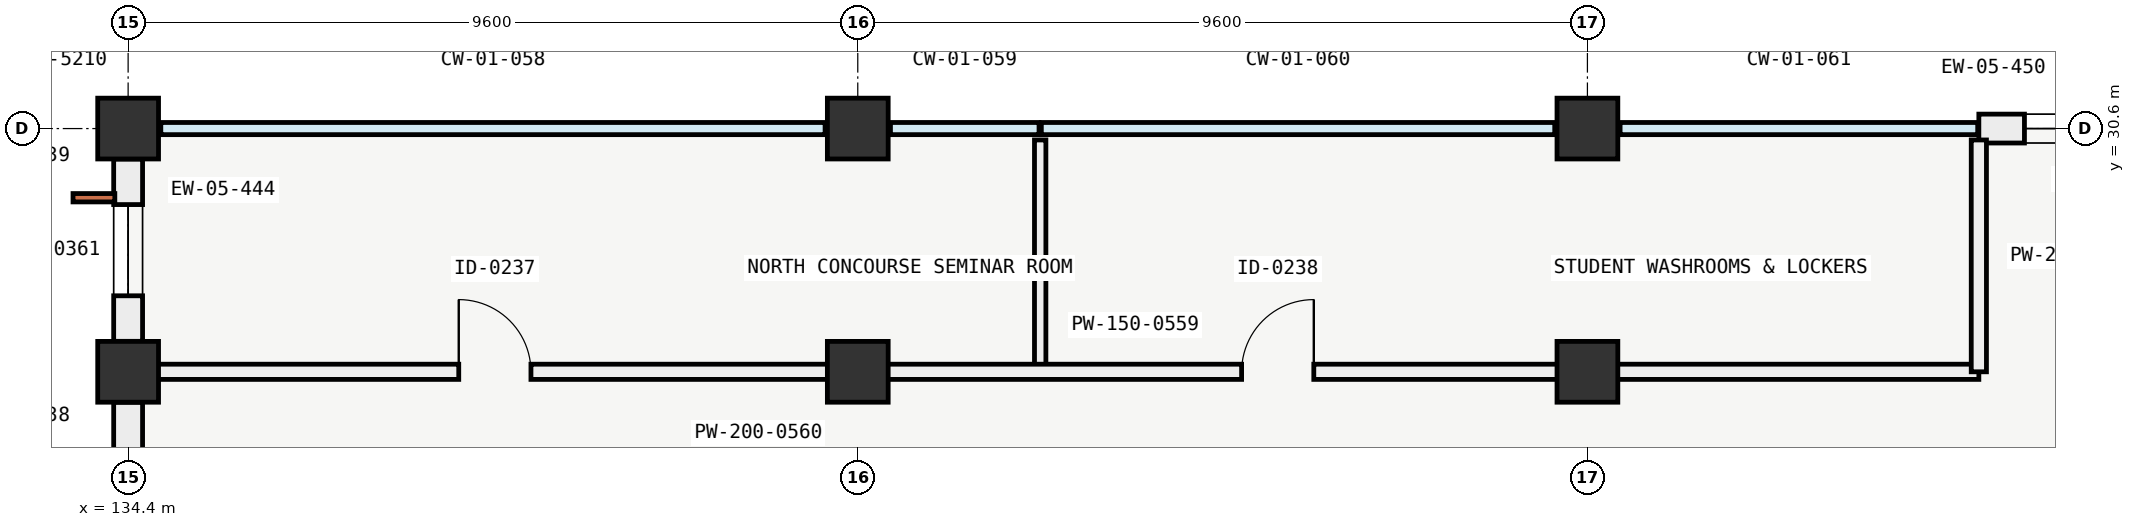
"""IFC4 building model, lengths in metres.
Left out: names, types, materials, properties, quantities, classifications, styles, units other than length and angle.
Written with IfcOpenShell. Run it as: python <this file> out.ifc"""

import sys

from ifc_helpers import new_model, si_unit, direction, frame, frame_2d, origin, origin_2d, place, context, subcontext, project, spatial, rectangle, extrude, element, fill, save


model = new_model("IFC4")
c1 = context("Model", 3, precision=1e-05, world=origin(), true_north=direction((0.0, 1.0)))
c2 = subcontext(c1, "Body", "Model", "MODEL_VIEW")
j1 = project(units=[si_unit("LENGTHUNIT", "METRE"), si_unit("PLANEANGLEUNIT", "RADIAN")], contexts=[c1])
p1 = place(None, origin())
s1 = spatial("IfcSite", under=j1, at=p1, CompositionType="ELEMENT")
p2 = place(p1, origin())
s2 = spatial("IfcBuilding", under=s1, at=p2, CompositionType="ELEMENT")
p3 = place(p2, frame((0.0, 0.0, 5.4)))
s3 = spatial("IfcBuildingStorey", under=s2, at=p3, CompositionType="ELEMENT", Elevation=5.4)
for number, where, z_axis, x_axis in (
    (1, (134.4, 27.4, 0.0), (0.0, 0.0, 1.0), (1.0, 0.0, 0.0)),
    (2, (134.4, 30.6, 0.0), (0.0, 0.0, 1.0), (1.0, 0.0, 0.0)),
    (3, (144.0, 27.4, 0.0), (0.0, 0.0, 1.0), (1.0, 0.0, 0.0)),
    (4, (144.0, 30.6, 0.0), (0.0, 0.0, 1.0), (1.0, 0.0, 0.0)),
    (5, (153.6, 27.4, 0.0), (0.0, 0.0, 1.0), (1.0, 0.0, 0.0)),
    (6, (153.6, 30.6, 0.0), (0.0, 0.0, 1.0), (1.0, 0.0, 0.0)),
):
    element("IfcColumn", number, at=place(p3, frame(where, z_axis=z_axis, x_axis=x_axis)), inside=s3, PredefinedType="COLUMN", context=c2, shape_type="SweptSolid", body=[
        extrude(rectangle(XDim=0.8, YDim=0.8, at=origin_2d()), origin(), (0.0, 0.0, 1.0), 4.2),
    ])
p4 = place(p3, frame((134.4, 24.601, 0.0), z_axis=(0.0, 0.0, 1.0), x_axis=(0.0, 1.0, 0.0)))
e7 = element("IfcWall", 7, at=p4, inside=s3, PredefinedType="SOLIDWALL", context=c2, shape_type="SweptSolid", body=[
    extrude(rectangle(XDim=2.398, YDim=0.38, at=frame_2d((1.199, 0.0))), origin(), (0.0, 0.0, 1.0), 3.25),
])
p5 = place(p4, frame((0.824, 0.0, 0.75)))
e8 = element("IfcOpeningElement", 8, at=p5, cuts=e7, PredefinedType="OPENING", context=c2, shape_type="SweptSolid", body=[
    extrude(rectangle(XDim=0.75, YDim=1.1, at=frame_2d((0.375, 0.55))), frame((0.0, 0.2, 0.0), z_axis=(0.0, -1.0, 0.0), x_axis=(1.0, 0.0, 0.0)), (0.0, 0.0, 1.0), 0.4),
])
p6 = place(p3, frame((134.4, 27.801, 0.0), z_axis=(0.0, 0.0, 1.0), x_axis=(0.0, 1.0, 0.0)))
e9 = element("IfcWall", 9, at=p6, inside=s3, PredefinedType="SOLIDWALL", context=c2, shape_type="SweptSolid", body=[
    extrude(rectangle(XDim=2.398, YDim=0.38, at=frame_2d((1.199, 0.0))), origin(), (0.0, 0.0, 1.0), 3.25),
])
p7 = place(p6, frame((0.599, 0.0, 0.9)))
e10 = element("IfcOpeningElement", 10, at=p7, cuts=e9, PredefinedType="OPENING", context=c2, shape_type="SweptSolid", body=[
    extrude(rectangle(XDim=1.2, YDim=1.8, at=frame_2d((0.6, 0.9))), frame((0.0, 0.2, 0.0), z_axis=(0.0, -1.0, 0.0), x_axis=(1.0, 0.0, 0.0)), (0.0, 0.0, 1.0), 0.4),
])
p8 = place(p3, frame((158.75, 30.6, 0.0), z_axis=(0.0, 0.0, 1.0), x_axis=(1.0, 0.0, 0.0)))
e11 = element("IfcWall", 11, at=p8, inside=s3, PredefinedType="SOLIDWALL", context=c2, shape_type="SweptSolid", body=[
    extrude(rectangle(XDim=3.2, YDim=0.38, at=frame_2d((1.6, 0.0))), origin(), (0.0, 0.0, 1.0), 3.25),
])
p9 = place(p8, frame((0.6, 0.0, 0.75)))
e12 = element("IfcOpeningElement", 12, at=p9, cuts=e11, PredefinedType="OPENING", context=c2, shape_type="SweptSolid", body=[
    extrude(rectangle(XDim=2.0, YDim=1.35, at=frame_2d((1.0, 0.675))), frame((0.0, 0.2, 0.0), z_axis=(0.0, -1.0, 0.0), x_axis=(1.0, 0.0, 0.0)), (0.0, 0.0, 1.0), 0.4),
])
p10 = place(p3, frame((146.4, 27.4, 0.0), z_axis=(0.0, 0.0, 1.0), x_axis=(0.0, 1.0, 0.0)))
e13 = element("IfcWall", 13, at=p10, inside=s3, PredefinedType="PARTITIONING", context=c2, shape_type="SweptSolid", body=[
    extrude(rectangle(XDim=3.05, YDim=0.15, at=frame_2d((1.525, 0.0))), origin(), (0.0, 0.0, 1.0), 3.85),
])
p11 = place(p3, frame((134.55, 27.4, 0.0), z_axis=(0.0, 0.0, 1.0), x_axis=(1.0, 0.0, 0.0)))
e14 = element("IfcWall", 14, at=p11, inside=s3, PredefinedType="PARTITIONING", context=c2, shape_type="SweptSolid", body=[
    extrude(rectangle(XDim=24.2, YDim=0.2, at=frame_2d((12.1, 0.0))), origin(), (0.0, 0.0, 1.0), 3.25),
])
p12 = place(p11, frame((4.2, 0.0, 0.0)))
e15 = element("IfcOpeningElement", 15, at=p12, cuts=e14, PredefinedType="OPENING", context=c2, shape_type="SweptSolid", body=[
    extrude(rectangle(XDim=0.95, YDim=2.1, at=frame_2d((0.475, 1.05))), frame((0.0, 0.11, 0.0), z_axis=(0.0, -1.0, 0.0), x_axis=(1.0, 0.0, 0.0)), (0.0, 0.0, 1.0), 0.22),
])
p13 = place(p11, frame((14.5, 0.0, 0.0)))
e16 = element("IfcOpeningElement", 16, at=p13, cuts=e14, PredefinedType="OPENING", context=c2, shape_type="SweptSolid", body=[
    extrude(rectangle(XDim=0.95, YDim=2.1, at=frame_2d((0.475, 1.05))), frame((0.0, 0.11, 0.0), z_axis=(0.0, -1.0, 0.0), x_axis=(1.0, 0.0, 0.0)), (0.0, 0.0, 1.0), 0.22),
])
p14 = place(p3, frame((158.75, 27.4, 0.0), z_axis=(0.0, 0.0, 1.0), x_axis=(0.0, 1.0, 0.0)))
e17 = element("IfcWall", 17, at=p14, inside=s3, PredefinedType="PARTITIONING", context=c2, shape_type="SweptSolid", body=[
    extrude(rectangle(XDim=3.05, YDim=0.2, at=frame_2d((1.525, 0.0))), origin(), (0.0, 0.0, 1.0), 3.85),
])
p15 = place(p7, origin())
e18 = element("IfcWindow", 18, at=p15, inside=s3, PartitioningType="SINGLE_PANEL", PredefinedType="WINDOW", context=c2, shape_type="SweptSolid", body=[
    extrude(rectangle(XDim=1.2, YDim=1.8, at=frame_2d((0.6, 0.9))), frame((0.0, 0.03, 0.0), z_axis=(0.0, -1.0, 0.0), x_axis=(1.0, 0.0, 0.0)), (0.0, 0.0, 1.0), 0.06),
])
fill(e10, e18)
p16 = place(p9, origin())
e19 = element("IfcWindow", 19, at=p16, inside=s3, PartitioningType="SINGLE_PANEL", PredefinedType="WINDOW", context=c2, shape_type="SweptSolid", body=[
    extrude(rectangle(XDim=2.0, YDim=1.35, at=frame_2d((1.0, 0.675))), frame((0.0, 0.03, 0.0), z_axis=(0.0, -1.0, 0.0), x_axis=(1.0, 0.0, 0.0)), (0.0, 0.0, 1.0), 0.06),
])
fill(e12, e19)
p17 = place(p12, origin())
e20 = element("IfcDoor", 20, at=p17, inside=s3, OperationType="SINGLE_SWING_LEFT", PredefinedType="DOOR", context=c2, shape_type="SweptSolid", body=[
    extrude(rectangle(XDim=0.95, YDim=2.1, at=frame_2d((0.475, 1.05))), frame((0.0, 0.025, 0.0), z_axis=(0.0, -1.0, 0.0), x_axis=(1.0, 0.0, 0.0)), (0.0, 0.0, 1.0), 0.05),
])
fill(e15, e20)
p18 = place(p13, origin())
e21 = element("IfcDoor", 21, at=p18, inside=s3, OperationType="SINGLE_SWING_RIGHT", PredefinedType="DOOR", context=c2, shape_type="SweptSolid", body=[
    extrude(rectangle(XDim=0.95, YDim=2.1, at=frame_2d((0.475, 1.05))), frame((0.0, 0.025, 0.0), z_axis=(0.0, -1.0, 0.0), x_axis=(1.0, 0.0, 0.0)), (0.0, 0.0, 1.0), 0.05),
])
fill(e16, e21)
save(model, sys.argv[1])
